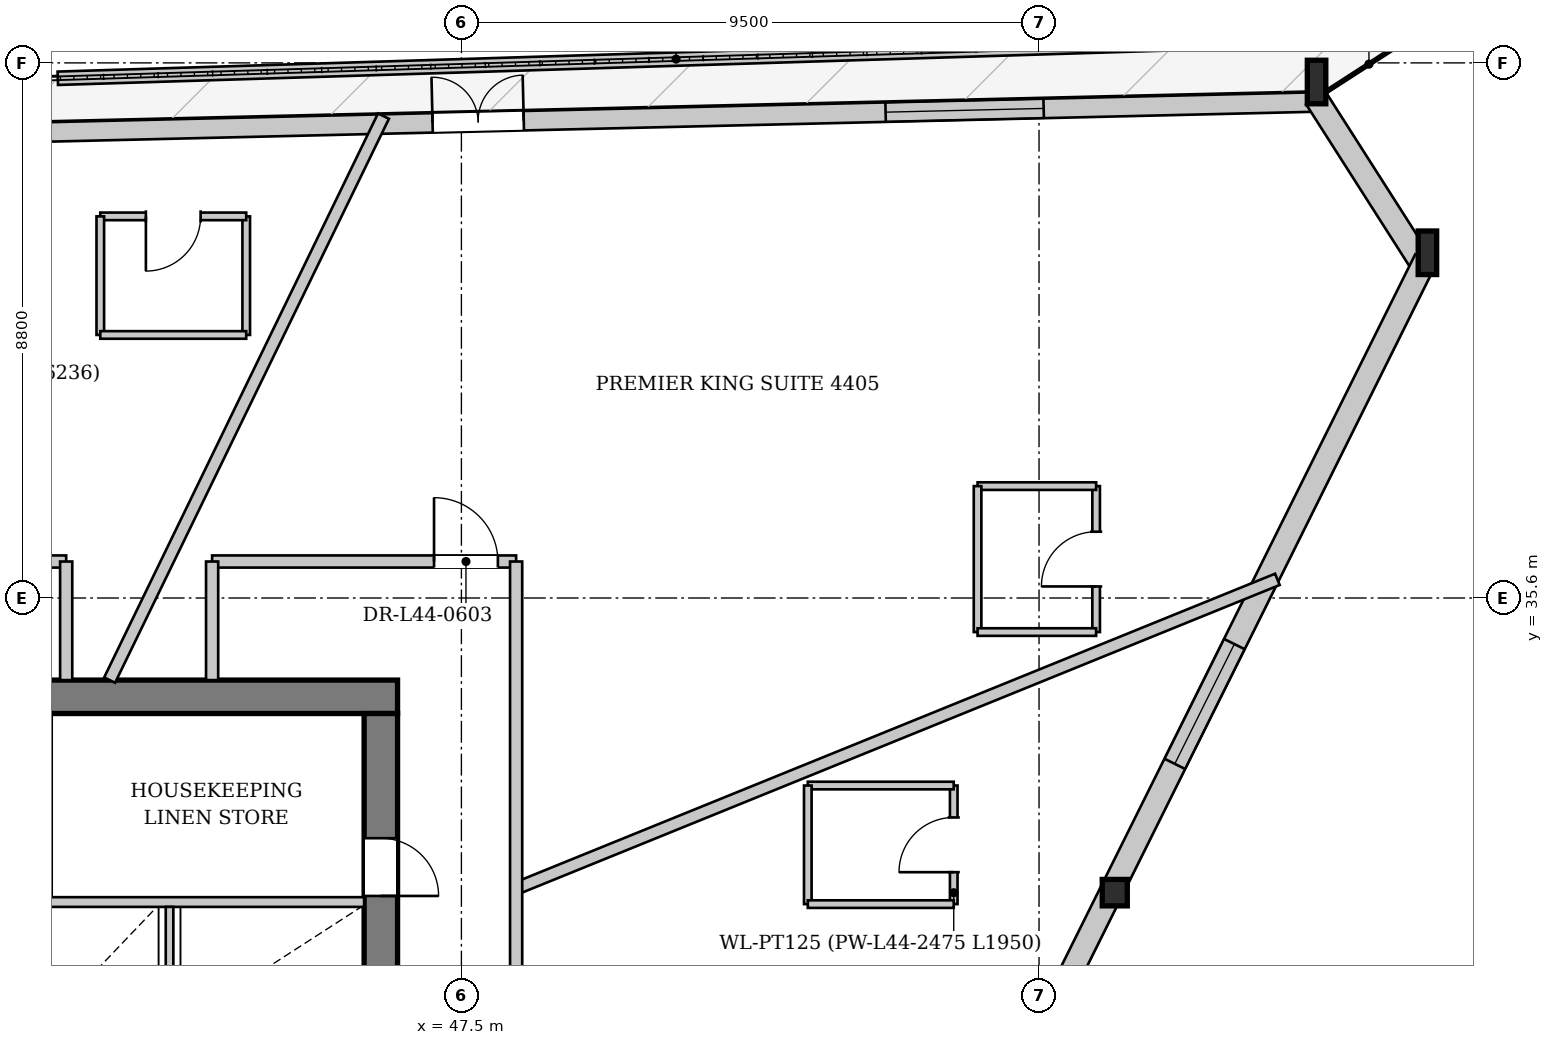
"""IFC4 building model, lengths in metres.
Left out: names, types, materials, properties, quantities, classifications, styles, units other than length and angle.
Written with IfcOpenShell. Run it as: python <this file> out.ifc"""

import sys

from ifc_helpers import new_model, si_unit, direction, frame, frame_2d, origin, origin_2d, place, context, subcontext, project, spatial, rectangle, i_section, extrude, source, transform, mapped, element, fill, save


model = new_model("IFC4")
c1 = context("Model", 3, precision=1e-05, world=origin(), true_north=direction((0.0, 1.0)))
c2 = subcontext(c1, "Body", "Model", "MODEL_VIEW")
j1 = project(units=[si_unit("LENGTHUNIT", "METRE"), si_unit("PLANEANGLEUNIT", "RADIAN")], contexts=[c1])
p1 = place(None, origin())
s1 = spatial("IfcSite", under=j1, at=p1, CompositionType="ELEMENT")
p2 = place(p1, origin())
s2 = spatial("IfcBuilding", under=s1, at=p2, CompositionType="ELEMENT")
p3 = place(p2, frame((0.0, 0.0, 167.9)))
s3 = spatial("IfcBuildingStorey", under=s2, at=p3, CompositionType="ELEMENT", Elevation=167.9)
m1 = source(origin(), c2, "Body", "SweptSolid", [
    extrude(i_section(OverallWidth=0.304, OverallDepth=0.716, WebThickness=0.021, FlangeThickness=0.04, at=origin_2d()), origin(), (0.0, 0.0, 1.0), 3.419),
])
p4 = place(p3, frame((63.527, 41.082, 0.0), z_axis=(-0.081267043669, 0.114188051693, 0.99012966649), x_axis=(-0.814730664559, -0.579839584908, 0.0)))
e1 = element("IfcColumn", 1, at=p4, inside=s3, PredefinedType="COLUMN", context=c2, shape_type="MappedRepresentation", body=[
    mapped(m1, transform((0.0, 0.0, 0.0), x_axis=(1.0, 0.0, 0.0), y_axis=(0.0, 1.0, 0.0), z_axis=(0.0, 0.0, 1.0), scale=1.0)),
])
m2 = source(origin(), c2, "Body", "SweptSolid", [
    extrude(i_section(OverallWidth=0.304, OverallDepth=0.716, WebThickness=0.021, FlangeThickness=0.04, at=origin_2d()), origin(), (0.0, 0.0, 1.0), 3.414),
])
p5 = place(p3, frame((61.715, 43.921, 0.0), z_axis=(-0.08816571419, 0.096531803858, 0.991417378144), x_axis=(-0.738378914552, -0.67438607529, 0.0)))
e2 = element("IfcColumn", 2, at=p5, inside=s3, PredefinedType="COLUMN", context=c2, shape_type="MappedRepresentation", body=[
    mapped(m2, transform((0.0, 0.0, 0.0), x_axis=(1.0, 0.0, 0.0), y_axis=(0.0, 1.0, 0.0), z_axis=(0.0, 0.0, 1.0), scale=1.0)),
])
m3 = source(origin(), c2, "Body", "SweptSolid", [
    extrude(i_section(OverallWidth=0.412, OverallDepth=0.435, WebThickness=0.031, FlangeThickness=0.05, at=origin_2d()), origin(), (0.0, 0.0, 1.0), 3.404),
])
p6 = place(p3, frame((58.309, 30.587, 0.0), z_axis=(-0.037225683015, 0.098120875462, 0.994478025058), x_axis=(-0.934974079161, -0.354716043191, 0.0)))
e3 = element("IfcColumn", 3, at=p6, inside=s3, PredefinedType="COLUMN", context=c2, shape_type="MappedRepresentation", body=[
    mapped(m3, transform((0.0, 0.0, 0.0), x_axis=(1.0, 0.0, 0.0), y_axis=(0.0, 1.0, 0.0), z_axis=(0.0, 0.0, 1.0), scale=1.0)),
])
p7 = place(p3, frame((38.862, 43.221, 0.0), z_axis=(0.0, 0.0, 1.0), x_axis=(0.999721247149, 0.023609913133, 0.0)))
e4 = element("IfcWall", 4, at=p7, inside=s3, PredefinedType="SOLIDWALL", context=c2, shape_type="SweptSolid", body=[
    extrude(rectangle(XDim=22.863, YDim=0.32, at=frame_2d((11.432, 0.0))), origin(), (0.0, 0.0, 1.0), 2.722),
])
p8 = place(p7, frame((8.166, 0.0, 0.0)))
e5 = element("IfcOpeningElement", 5, at=p8, cuts=e4, PredefinedType="OPENING", context=c2, shape_type="SweptSolid", body=[
    extrude(rectangle(XDim=1.5, YDim=2.3, at=frame_2d((0.75, 1.15))), frame((0.0, 0.17, 0.0), z_axis=(0.0, -1.0, 0.0), x_axis=(1.0, 0.0, 0.0)), (0.0, 0.0, 1.0), 0.34),
])
p9 = place(p7, frame((15.619, 0.0, 0.252)))
e6 = element("IfcOpeningElement", 6, at=p9, cuts=e4, PredefinedType="OPENING", context=c2, shape_type="SweptSolid", body=[
    extrude(rectangle(XDim=2.6, YDim=2.35, at=frame_2d((1.3, 1.175))), frame((0.0, 0.17, 0.0), z_axis=(0.0, -1.0, 0.0), x_axis=(1.0, 0.0, 0.0)), (0.0, 0.0, 1.0), 0.34),
])
p10 = place(p3, frame((61.554, 43.818, 0.0), z_axis=(0.0, 0.0, 1.0), x_axis=(0.538043125275, -0.842917312282, 0.0)))
e7 = element("IfcWall", 7, at=p10, inside=s3, PredefinedType="SOLIDWALL", context=c2, shape_type="SweptSolid", body=[
    extrude(rectangle(XDim=3.367, YDim=0.38, at=frame_2d((1.684, 0.0))), origin(), (0.0, 0.0, 1.0), 2.722),
])
p11 = place(p3, frame((63.356, 41.167, 0.0), z_axis=(0.0, 0.0, 1.0), x_axis=(-0.44519188478, -0.895435193482, 0.0)))
e8 = element("IfcWall", 8, at=p11, inside=s3, PredefinedType="SOLIDWALL", context=c2, shape_type="SweptSolid", body=[
    extrude(rectangle(XDim=23.441, YDim=0.38, at=frame_2d((11.72, 0.0))), origin(), (0.0, 0.0, 1.0), 2.722),
])
p12 = place(p11, frame((7.063, 0.0, 0.352)))
e9 = element("IfcOpeningElement", 9, at=p12, cuts=e8, PredefinedType="OPENING", context=c2, shape_type="SweptSolid", body=[
    extrude(rectangle(XDim=2.2, YDim=2.25, at=frame_2d((1.1, 1.125))), frame((0.0, 0.2, 0.0), z_axis=(0.0, -1.0, 0.0), x_axis=(1.0, 0.0, 0.0)), (0.0, 0.0, 1.0), 0.4),
])
p13 = place(p11, frame((15.777, 0.0, 0.352)))
e10 = element("IfcOpeningElement", 10, at=p13, cuts=e8, PredefinedType="OPENING", context=c2, shape_type="SweptSolid", body=[
    extrude(rectangle(XDim=2.2, YDim=2.25, at=frame_2d((1.1, 1.125))), frame((0.0, 0.2, 0.0), z_axis=(0.0, -1.0, 0.0), x_axis=(1.0, 0.0, 0.0)), (0.0, 0.0, 1.0), 0.4),
])
p14 = place(p3, frame((61.2, 44.778, 0.0), z_axis=(0.0, 0.0, 1.0), x_axis=(-0.999519608931, -0.030992763077, 0.0)))
e11 = element("IfcWall", 11, at=p14, inside=s3, PredefinedType="PARAPET", context=c2, shape_type="SweptSolid", body=[
    extrude(rectangle(XDim=20.347, YDim=0.22, at=frame_2d((10.174, 0.0))), origin(), (0.0, 0.0, 1.0), 0.3),
])
p15 = place(p3, frame((29.55, 33.975, 0.0), z_axis=(0.0, 0.0, 1.0), x_axis=(1.0, 0.0, 0.0)))
e12 = element("IfcWall", 12, at=p15, inside=s3, PredefinedType="SHEAR", context=c2, shape_type="SweptSolid", body=[
    extrude(rectangle(XDim=16.9, YDim=0.55, at=frame_2d((8.45, 0.0))), origin(), (0.0, 0.0, 1.0), 3.33),
])
p16 = place(p15, frame((1.55, 0.0, 0.0)))
e13 = element("IfcOpeningElement", 13, at=p16, cuts=e12, PredefinedType="OPENING", context=c2, shape_type="SweptSolid", body=[
    extrude(rectangle(XDim=0.95, YDim=2.1, at=frame_2d((0.475, 1.05))), frame((0.0, 0.285, 0.0), z_axis=(0.0, -1.0, 0.0), x_axis=(1.0, 0.0, 0.0)), (0.0, 0.0, 1.0), 0.57),
])
p17 = place(p15, frame((3.93, 0.0, 0.0)))
e14 = element("IfcOpeningElement", 14, at=p17, cuts=e12, PredefinedType="OPENING", context=c2, shape_type="SweptSolid", body=[
    extrude(rectangle(XDim=1.32, YDim=2.2, at=frame_2d((0.66, 1.1))), frame((0.0, 0.285, 0.0), z_axis=(0.0, -1.0, 0.0), x_axis=(1.0, 0.0, 0.0)), (0.0, 0.0, 1.0), 0.57),
])
p18 = place(p3, frame((46.175, 33.7, 0.0), z_axis=(0.0, 0.0, 1.0), x_axis=(0.0, -1.0, 0.0)))
e15 = element("IfcWall", 15, at=p18, inside=s3, PredefinedType="SHEAR", context=c2, shape_type="SweptSolid", body=[
    extrude(rectangle(XDim=14.2, YDim=0.55, at=frame_2d((7.1, 0.0))), origin(), (0.0, 0.0, 1.0), 3.33),
])
p19 = place(p18, frame((5.18, 0.0, 0.0)))
e16 = element("IfcOpeningElement", 16, at=p19, cuts=e15, PredefinedType="OPENING", context=c2, shape_type="SweptSolid", body=[
    extrude(rectangle(XDim=1.6, YDim=2.2, at=frame_2d((0.8, 1.1))), frame((0.0, 0.285, 0.0), z_axis=(0.0, -1.0, 0.0), x_axis=(1.0, 0.0, 0.0)), (0.0, 0.0, 1.0), 0.57),
])
p20 = place(p18, frame((2.05, 0.0, 0.0)))
e17 = element("IfcOpeningElement", 17, at=p20, cuts=e15, PredefinedType="OPENING", context=c2, shape_type="SweptSolid", body=[
    extrude(rectangle(XDim=0.95, YDim=2.1, at=frame_2d((0.475, 1.05))), frame((0.0, 0.285, 0.0), z_axis=(0.0, -1.0, 0.0), x_axis=(1.0, 0.0, 0.0)), (0.0, 0.0, 1.0), 0.57),
])
p21 = place(p3, frame((40.72, 30.6, 0.0), z_axis=(0.0, 0.0, 1.0), x_axis=(1.0, 0.0, 0.0)))
e18 = element("IfcWall", 18, at=p21, inside=s3, PredefinedType="PARTITIONING", context=c2, shape_type="SweptSolid", body=[
    extrude(rectangle(XDim=5.18, YDim=0.16, at=frame_2d((2.59, 0.0))), origin(), (0.0, 0.0, 1.0), 3.33),
])
p22 = place(p3, frame((42.7, 28.6, 0.0), z_axis=(0.0, 0.0, 1.0), x_axis=(0.0, 1.0, 0.0)))
e19 = element("IfcWall", 19, at=p22, inside=s3, PredefinedType="PARTITIONING", context=c2, shape_type="SweptSolid", body=[
    extrude(rectangle(XDim=1.92, YDim=0.125, at=frame_2d((0.96, 0.0))), origin(), (0.0, 0.0, 1.0), 3.33),
])
p23 = place(p3, frame((48.4, 30.823, 0.0), z_axis=(0.0, 0.0, 1.0), x_axis=(0.926531533204, 0.376217115477, 0.0)))
e20 = element("IfcWall", 20, at=p23, inside=s3, PredefinedType="PARTITIONING", context=c2, shape_type="SweptSolid", body=[
    extrude(rectangle(XDim=13.513, YDim=0.2, at=frame_2d((6.756, 0.0))), origin(), (0.0, 0.0, 1.0), 3.33),
])
p24 = place(p3, frame((41.715, 34.25, 0.0), z_axis=(0.0, 0.0, 1.0), x_axis=(0.436811995944, 0.899552822351, 0.0)))
e21 = element("IfcWall", 21, at=p24, inside=s3, PredefinedType="PARTITIONING", context=c2, shape_type="SweptSolid", body=[
    extrude(rectangle(XDim=10.31, YDim=0.2, at=frame_2d((5.155, 0.0))), origin(), (0.0, 0.0, 1.0), 3.33),
])
p25 = place(p3, frame((55.597, 30.566, 0.0), z_axis=(0.0, 0.0, 1.0), x_axis=(0.0, 1.0, 0.0)))
e22 = element("IfcWall", 22, at=p25, inside=s3, PredefinedType="PARTITIONING", context=c2, shape_type="SweptSolid", body=[
    extrude(rectangle(XDim=1.95, YDim=0.125, at=frame_2d((0.975, 0.0))), origin(), (0.0, 0.0, 1.0), 3.33),
])
p26 = place(p25, frame((0.525, 0.0, 0.0)))
e23 = element("IfcOpeningElement", 23, at=p26, cuts=e22, PredefinedType="OPENING", context=c2, shape_type="SweptSolid", body=[
    extrude(rectangle(XDim=0.9, YDim=2.1, at=frame_2d((0.45, 1.05))), frame((0.0, 0.073, 0.0), z_axis=(0.0, -1.0, 0.0), x_axis=(1.0, 0.0, 0.0)), (0.0, 0.0, 1.0), 0.145),
])
p27 = place(p3, frame((55.597, 32.516, 0.0), z_axis=(0.0, 0.0, 1.0), x_axis=(-1.0, 0.0, 0.0)))
e24 = element("IfcWall", 24, at=p27, inside=s3, PredefinedType="PARTITIONING", context=c2, shape_type="SweptSolid", body=[
    extrude(rectangle(XDim=2.4, YDim=0.125, at=frame_2d((1.2, 0.0))), origin(), (0.0, 0.0, 1.0), 3.33),
])
p28 = place(p3, frame((53.197, 32.516, 0.0), z_axis=(0.0, 0.0, 1.0), x_axis=(0.0, -1.0, 0.0)))
e25 = element("IfcWall", 25, at=p28, inside=s3, PredefinedType="PARTITIONING", context=c2, shape_type="SweptSolid", body=[
    extrude(rectangle(XDim=1.95, YDim=0.125, at=frame_2d((0.975, 0.0))), origin(), (0.0, 0.0, 1.0), 3.33),
])
p29 = place(p3, frame((53.197, 30.566, 0.0), z_axis=(0.0, 0.0, 1.0), x_axis=(1.0, 0.0, 0.0)))
e26 = element("IfcWall", 26, at=p29, inside=s3, PredefinedType="PARTITIONING", context=c2, shape_type="SweptSolid", body=[
    extrude(rectangle(XDim=2.4, YDim=0.125, at=frame_2d((1.2, 0.0))), origin(), (0.0, 0.0, 1.0), 3.33),
])
p30 = place(p3, frame((57.939, 35.04, 0.0), z_axis=(0.0, 0.0, 1.0), x_axis=(0.0, 1.0, 0.0)))
e27 = element("IfcWall", 27, at=p30, inside=s3, PredefinedType="PARTITIONING", context=c2, shape_type="SweptSolid", body=[
    extrude(rectangle(XDim=2.4, YDim=0.125, at=frame_2d((1.2, 0.0))), origin(), (0.0, 0.0, 1.0), 3.33),
])
p31 = place(p30, frame((0.75, 0.0, 0.0)))
e28 = element("IfcOpeningElement", 28, at=p31, cuts=e27, PredefinedType="OPENING", context=c2, shape_type="SweptSolid", body=[
    extrude(rectangle(XDim=0.9, YDim=2.1, at=frame_2d((0.45, 1.05))), frame((0.0, 0.073, 0.0), z_axis=(0.0, -1.0, 0.0), x_axis=(1.0, 0.0, 0.0)), (0.0, 0.0, 1.0), 0.145),
])
p32 = place(p3, frame((57.939, 37.44, 0.0), z_axis=(0.0, 0.0, 1.0), x_axis=(-1.0, 0.0, 0.0)))
e29 = element("IfcWall", 29, at=p32, inside=s3, PredefinedType="PARTITIONING", context=c2, shape_type="SweptSolid", body=[
    extrude(rectangle(XDim=1.95, YDim=0.125, at=frame_2d((0.975, 0.0))), origin(), (0.0, 0.0, 1.0), 2.925),
])
p33 = place(p3, frame((55.989, 37.44, 0.0), z_axis=(0.0, 0.0, 1.0), x_axis=(0.0, -1.0, 0.0)))
e30 = element("IfcWall", 30, at=p33, inside=s3, PredefinedType="PARTITIONING", context=c2, shape_type="SweptSolid", body=[
    extrude(rectangle(XDim=2.4, YDim=0.125, at=frame_2d((1.2, 0.0))), origin(), (0.0, 0.0, 1.0), 3.33),
])
for number, where, z_axis, x_axis in (
    (31, (55.989, 35.04, 0.0), (0.0, 0.0, 1.0), (1.0, 0.0, 0.0)),
    (32, (43.961, 39.926, 0.0), (0.0, 0.0, 1.0), (0.0, 1.0, 0.0)),
):
    element("IfcWall", number, at=place(p3, frame(where, z_axis=z_axis, x_axis=x_axis)), inside=s3, PredefinedType="PARTITIONING", context=c2, shape_type="SweptSolid", body=[
        extrude(rectangle(XDim=1.95, YDim=0.125, at=frame_2d((0.975, 0.0))), origin(), (0.0, 0.0, 1.0), 3.33),
    ])
p34 = place(p3, frame((43.961, 41.876, 0.0), z_axis=(0.0, 0.0, 1.0), x_axis=(-1.0, 0.0, 0.0)))
e33 = element("IfcWall", 33, at=p34, inside=s3, PredefinedType="PARTITIONING", context=c2, shape_type="SweptSolid", body=[
    extrude(rectangle(XDim=2.4, YDim=0.125, at=frame_2d((1.2, 0.0))), origin(), (0.0, 0.0, 1.0), 3.33),
])
p35 = place(p34, frame((0.75, 0.0, 0.0)))
e34 = element("IfcOpeningElement", 34, at=p35, cuts=e33, PredefinedType="OPENING", context=c2, shape_type="SweptSolid", body=[
    extrude(rectangle(XDim=0.9, YDim=2.1, at=frame_2d((0.45, 1.05))), frame((0.0, 0.073, 0.0), z_axis=(0.0, -1.0, 0.0), x_axis=(1.0, 0.0, 0.0)), (0.0, 0.0, 1.0), 0.145),
])
p36 = place(p3, frame((41.561, 41.876, 0.0), z_axis=(0.0, 0.0, 1.0), x_axis=(0.0, -1.0, 0.0)))
e35 = element("IfcWall", 35, at=p36, inside=s3, PredefinedType="PARTITIONING", context=c2, shape_type="SweptSolid", body=[
    extrude(rectangle(XDim=1.95, YDim=0.125, at=frame_2d((0.975, 0.0))), origin(), (0.0, 0.0, 1.0), 3.33),
])
p37 = place(p3, frame((41.561, 39.926, 0.0), z_axis=(0.0, 0.0, 1.0), x_axis=(1.0, 0.0, 0.0)))
e36 = element("IfcWall", 36, at=p37, inside=s3, PredefinedType="PARTITIONING", context=c2, shape_type="SweptSolid", body=[
    extrude(rectangle(XDim=2.4, YDim=0.125, at=frame_2d((1.2, 0.0))), origin(), (0.0, 0.0, 1.0), 3.075),
])
p38 = place(p3, frame((27.6, 36.2, 0.0), z_axis=(0.0, 0.0, 1.0), x_axis=(1.0, 0.0, 0.0)))
e37 = element("IfcWall", 37, at=p38, inside=s3, PredefinedType="PARTITIONING", context=c2, shape_type="SweptSolid", body=[
    extrude(rectangle(XDim=13.4, YDim=0.2, at=frame_2d((6.7, 0.0))), origin(), (0.0, 0.0, 1.0), 3.33),
])
p39 = place(p38, frame((11.742, 0.0, 0.0)))
e38 = element("IfcOpeningElement", 38, at=p39, cuts=e37, PredefinedType="OPENING", context=c2, shape_type="SweptSolid", body=[
    extrude(rectangle(XDim=1.05, YDim=2.2, at=frame_2d((0.525, 1.1))), frame((0.0, 0.11, 0.0), z_axis=(0.0, -1.0, 0.0), x_axis=(1.0, 0.0, 0.0)), (0.0, 0.0, 1.0), 0.22),
])
p40 = place(p3, frame((41.0, 34.25, 0.0), z_axis=(0.0, 0.0, 1.0), x_axis=(0.0, 1.0, 0.0)))
e39 = element("IfcWall", 39, at=p40, inside=s3, PredefinedType="PARTITIONING", context=c2, shape_type="SweptSolid", body=[
    extrude(rectangle(XDim=1.95, YDim=0.2, at=frame_2d((0.975, 0.0))), origin(), (0.0, 0.0, 1.0), 3.33),
])
p41 = place(p3, frame((43.4, 36.2, 0.0), z_axis=(0.0, 0.0, 1.0), x_axis=(1.0, 0.0, 0.0)))
e40 = element("IfcWall", 40, at=p41, inside=s3, PredefinedType="PARTITIONING", context=c2, shape_type="SweptSolid", body=[
    extrude(rectangle(XDim=5.0, YDim=0.2, at=frame_2d((2.5, 0.0))), origin(), (0.0, 0.0, 1.0), 3.33),
])
p42 = place(p41, frame((3.65, 0.0, 0.0)))
e41 = element("IfcOpeningElement", 41, at=p42, cuts=e40, PredefinedType="OPENING", context=c2, shape_type="SweptSolid", body=[
    extrude(rectangle(XDim=1.05, YDim=2.2, at=frame_2d((0.525, 1.1))), frame((0.0, 0.11, 0.0), z_axis=(0.0, -1.0, 0.0), x_axis=(1.0, 0.0, 0.0)), (0.0, 0.0, 1.0), 0.22),
])
p43 = place(p3, frame((43.4, 34.25, 0.0), z_axis=(0.0, 0.0, 1.0), x_axis=(0.0, 1.0, 0.0)))
e42 = element("IfcWall", 42, at=p43, inside=s3, PredefinedType="PARTITIONING", context=c2, shape_type="SweptSolid", body=[
    extrude(rectangle(XDim=1.95, YDim=0.2, at=frame_2d((0.975, 0.0))), origin(), (0.0, 0.0, 1.0), 3.33),
])
p44 = place(p3, frame((48.4, 17.0, 0.0), z_axis=(0.0, 0.0, 1.0), x_axis=(0.0, 1.0, 0.0)))
e43 = element("IfcWall", 43, at=p44, inside=s3, PredefinedType="PARTITIONING", context=c2, shape_type="SweptSolid", body=[
    extrude(rectangle(XDim=19.2, YDim=0.2, at=frame_2d((9.6, 0.0))), origin(), (0.0, 0.0, 1.0), 3.33),
])
p45 = place(p44, frame((7.999, 0.0, 0.0)))
e44 = element("IfcOpeningElement", 44, at=p45, cuts=e43, PredefinedType="OPENING", context=c2, shape_type="SweptSolid", body=[
    extrude(rectangle(XDim=1.05, YDim=2.2, at=frame_2d((0.525, 1.1))), frame((0.0, 0.11, 0.0), z_axis=(0.0, -1.0, 0.0), x_axis=(1.0, 0.0, 0.0)), (0.0, 0.0, 1.0), 0.22),
])
m4 = source(origin(), c2, "Body", "SweptSolid", [
    extrude(rectangle(XDim=1.5, YDim=2.3, at=frame_2d((0.75, 1.15))), frame((0.0, 0.025, 0.0), z_axis=(0.0, -1.0, 0.0), x_axis=(1.0, 0.0, 0.0)), (0.0, 0.0, 1.0), 0.05),
])
p46 = place(p8, origin())
e45 = element("IfcDoor", 45, at=p46, inside=s3, OperationType="DOUBLE_DOOR_SINGLE_SWING", PredefinedType="DOOR", context=c2, shape_type="MappedRepresentation", body=[
    mapped(m4, transform((0.0, 0.0, 0.0), x_axis=(1.0, 0.0, 0.0), y_axis=(0.0, 1.0, 0.0), z_axis=(0.0, 0.0, 1.0), scale=1.0)),
])
fill(e5, e45)
m5 = source(origin(), c2, "Body", "SweptSolid", [
    extrude(rectangle(XDim=2.6, YDim=2.35, at=frame_2d((1.3, 1.175))), frame((0.0, 0.03, 0.0), z_axis=(0.0, -1.0, 0.0), x_axis=(1.0, 0.0, 0.0)), (0.0, 0.0, 1.0), 0.06),
])
p47 = place(p9, origin())
e46 = element("IfcWindow", 46, at=p47, inside=s3, PartitioningType="SINGLE_PANEL", PredefinedType="WINDOW", context=c2, shape_type="MappedRepresentation", body=[
    mapped(m5, transform((0.0, 0.0, 0.0), x_axis=(1.0, 0.0, 0.0), y_axis=(0.0, 1.0, 0.0), z_axis=(0.0, 0.0, 1.0), scale=1.0)),
])
fill(e6, e46)
m6 = source(origin(), c2, "Body", "SweptSolid", [
    extrude(rectangle(XDim=2.2, YDim=2.25, at=frame_2d((1.1, 1.125))), frame((0.0, 0.03, 0.0), z_axis=(0.0, -1.0, 0.0), x_axis=(1.0, 0.0, 0.0)), (0.0, 0.0, 1.0), 0.06),
])
p48 = place(p12, origin())
e47 = element("IfcWindow", 47, at=p48, inside=s3, PartitioningType="SINGLE_PANEL", PredefinedType="WINDOW", context=c2, shape_type="MappedRepresentation", body=[
    mapped(m6, transform((0.0, 0.0, 0.0), x_axis=(1.0, 0.0, 0.0), y_axis=(0.0, 1.0, 0.0), z_axis=(0.0, 0.0, 1.0), scale=1.0)),
])
fill(e9, e47)
m7 = source(origin(), c2, "Body", "SweptSolid", [
    extrude(rectangle(XDim=0.95, YDim=2.1, at=frame_2d((0.475, 1.05))), frame((0.0, 0.025, 0.0), z_axis=(0.0, -1.0, 0.0), x_axis=(1.0, 0.0, 0.0)), (0.0, 0.0, 1.0), 0.05),
])
p49 = place(p20, origin())
e48 = element("IfcDoor", 48, at=p49, inside=s3, OperationType="SINGLE_SWING_RIGHT", PredefinedType="DOOR", context=c2, shape_type="MappedRepresentation", body=[
    mapped(m7, transform((0.0, 0.0, 0.0), x_axis=(1.0, 0.0, 0.0), y_axis=(0.0, 1.0, 0.0), z_axis=(0.0, 0.0, 1.0), scale=1.0)),
])
fill(e17, e48)
m8 = source(origin(), c2, "Body", "SweptSolid", [
    extrude(rectangle(XDim=0.9, YDim=2.1, at=frame_2d((0.45, 1.05))), frame((0.0, 0.025, 0.0), z_axis=(0.0, -1.0, 0.0), x_axis=(1.0, 0.0, 0.0)), (0.0, 0.0, 1.0), 0.05),
])
p50 = place(p26, origin())
e49 = element("IfcDoor", 49, at=p50, inside=s3, OperationType="SINGLE_SWING_LEFT", PredefinedType="DOOR", context=c2, shape_type="MappedRepresentation", body=[
    mapped(m8, transform((0.0, 0.0, 0.0), x_axis=(1.0, 0.0, 0.0), y_axis=(0.0, 1.0, 0.0), z_axis=(0.0, 0.0, 1.0), scale=1.0)),
])
fill(e23, e49)
p51 = place(p31, origin())
e50 = element("IfcDoor", 50, at=p51, inside=s3, OperationType="SINGLE_SWING_LEFT", PredefinedType="DOOR", context=c2, shape_type="MappedRepresentation", body=[
    mapped(m8, transform((0.0, 0.0, 0.0), x_axis=(1.0, 0.0, 0.0), y_axis=(0.0, 1.0, 0.0), z_axis=(0.0, 0.0, 1.0), scale=1.0)),
])
fill(e28, e50)
p52 = place(p35, origin())
e51 = element("IfcDoor", 51, at=p52, inside=s3, OperationType="SINGLE_SWING_RIGHT", PredefinedType="DOOR", context=c2, shape_type="MappedRepresentation", body=[
    mapped(m8, transform((0.0, 0.0, 0.0), x_axis=(1.0, 0.0, 0.0), y_axis=(0.0, 1.0, 0.0), z_axis=(0.0, 0.0, 1.0), scale=1.0)),
])
fill(e34, e51)
m9 = source(origin(), c2, "Body", "SweptSolid", [
    extrude(rectangle(XDim=1.05, YDim=2.2, at=frame_2d((0.525, 1.1))), frame((0.0, 0.025, 0.0), z_axis=(0.0, -1.0, 0.0), x_axis=(1.0, 0.0, 0.0)), (0.0, 0.0, 1.0), 0.05),
])
p53 = place(p42, origin())
e52 = element("IfcDoor", 52, at=p53, inside=s3, OperationType="SINGLE_SWING_LEFT", PredefinedType="DOOR", context=c2, shape_type="MappedRepresentation", body=[
    mapped(m9, transform((0.0, 0.0, 0.0), x_axis=(1.0, 0.0, 0.0), y_axis=(0.0, 1.0, 0.0), z_axis=(0.0, 0.0, 1.0), scale=1.0)),
])
fill(e41, e52)
save(model, sys.argv[1])
